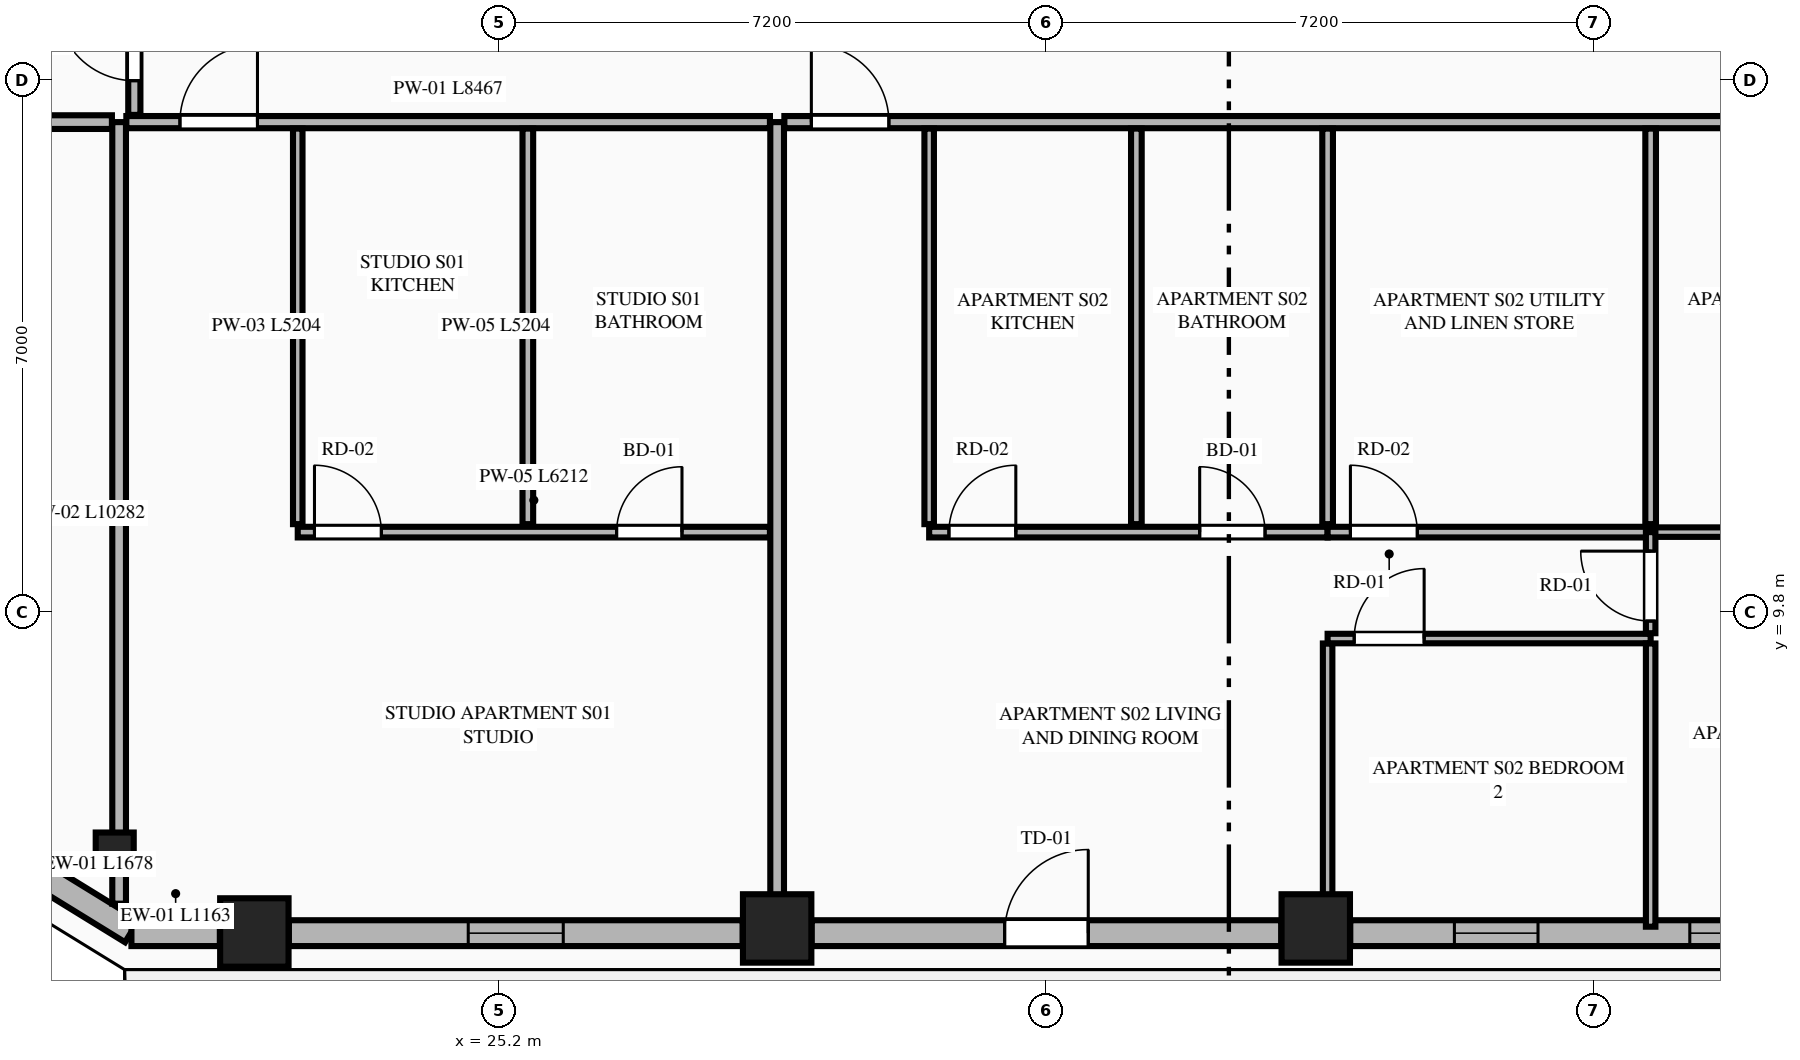
"""IFC4 building model, lengths in metres.
Left out: names, types, materials, properties, quantities, classifications, styles, units other than length and angle.
Written with IfcOpenShell. Run it as: python <this file> out.ifc"""

import sys

from ifc_helpers import new_model, si_unit, direction, frame, frame_2d, origin, origin_2d, place, context, subcontext, project, spatial, rectangle, extrude, element, fill, save


model = new_model("IFC4")
c1 = context("Model", 3, precision=1e-05, world=origin(), true_north=direction((0.0, 1.0)))
c2 = subcontext(c1, "Body", "Model", "MODEL_VIEW")
j1 = project(units=[si_unit("LENGTHUNIT", "METRE"), si_unit("PLANEANGLEUNIT", "RADIAN")], contexts=[c1])
p1 = place(None, origin())
s1 = spatial("IfcSite", under=j1, at=p1, CompositionType="ELEMENT")
p2 = place(p1, origin())
s2 = spatial("IfcBuilding", under=s1, at=p2, CompositionType="ELEMENT")
p3 = place(p2, frame((0.0, 0.0, 175.45)))
s3 = spatial("IfcBuildingStorey", under=s2, at=p3, CompositionType="ELEMENT", Elevation=175.45)
for number, where, z_axis, x_axis in (
    (1, (21.979, 5.589, 0.0), (0.0, 0.0, 1.0), (1.0, 0.0, 0.0)),
    (2, (28.857, 5.642, 0.0), (0.0, 0.0, 1.0), (1.0, 0.0, 0.0)),
    (3, (35.943, 5.642, 0.0), (0.0, 0.0, 1.0), (1.0, 0.0, 0.0)),
):
    element("IfcColumn", number, at=place(p3, frame(where, z_axis=z_axis, x_axis=x_axis)), inside=s3, PredefinedType="COLUMN", context=c2, shape_type="SweptSolid", body=[
        extrude(rectangle(XDim=0.9, YDim=0.9, at=origin_2d()), origin(), (0.0, 0.0, 1.0), 3.55),
    ])
p4 = place(p3, frame((20.142, 6.654, 0.0), z_axis=(0.0, 0.0, 1.0), x_axis=(0.865230187018, -0.501374833306, 0.0)))
e4 = element("IfcColumn", 4, at=p4, inside=s3, PredefinedType="PILASTER", context=c2, shape_type="SweptSolid", body=[
    extrude(rectangle(XDim=0.5, YDim=0.35, at=origin_2d()), origin(), (0.0, 0.0, 1.0), 3.55),
])
p5 = place(p3, frame((18.938, 6.484, 0.0), z_axis=(0.0, 0.0, 1.0), x_axis=(0.851778214877, -0.523902541185, 0.0)))
e5 = element("IfcWall", 5, at=p5, inside=s3, PredefinedType="STANDARD", context=c2, shape_type="SweptSolid", body=[
    extrude(rectangle(XDim=1.678, YDim=0.34, at=frame_2d((0.839, 0.0))), origin(), (0.0, 0.0, 1.0), 3.35),
])
p6 = place(p3, frame((20.362, 5.58, 0.0), z_axis=(0.0, 0.0, 1.0), x_axis=(1.0, 0.0, 0.0)))
e6 = element("IfcWall", 6, at=p6, inside=s3, PredefinedType="STANDARD", context=c2, shape_type="SweptSolid", body=[
    extrude(rectangle(XDim=1.163, YDim=0.34, at=frame_2d((0.582, 0.0))), origin(), (0.0, 0.0, 1.0), 3.35),
])
p7 = place(p3, frame((22.433, 5.58, 0.0), z_axis=(0.0, 0.0, 1.0), x_axis=(1.0, 0.0, 0.0)))
e7 = element("IfcWall", 7, at=p7, inside=s3, PredefinedType="STANDARD", context=c2, shape_type="SweptSolid", body=[
    extrude(rectangle(XDim=5.97, YDim=0.34, at=frame_2d((2.985, 0.0))), origin(), (0.0, 0.0, 1.0), 2.883),
])
p8 = place(p7, frame((2.36, 0.0, 0.75)))
e8 = element("IfcOpeningElement", 8, at=p8, cuts=e7, PredefinedType="OPENING", context=c2, shape_type="SweptSolid", body=[
    extrude(rectangle(XDim=1.25, YDim=1.95, at=frame_2d((0.625, 0.975))), frame((0.0, 0.18, 0.0), z_axis=(0.0, -1.0, 0.0), x_axis=(1.0, 0.0, 0.0)), (0.0, 0.0, 1.0), 0.36),
])
p9 = place(p3, frame((29.311, 5.58, 0.0), z_axis=(0.0, 0.0, 1.0), x_axis=(1.0, 0.0, 0.0)))
e9 = element("IfcWall", 9, at=p9, inside=s3, PredefinedType="STANDARD", context=c2, shape_type="SweptSolid", body=[
    extrude(rectangle(XDim=6.178, YDim=0.34, at=frame_2d((3.089, 0.0))), origin(), (0.0, 0.0, 1.0), 2.883),
])
p10 = place(p9, frame((2.539, 0.0, 0.0)))
e10 = element("IfcOpeningElement", 10, at=p10, cuts=e9, PredefinedType="OPENING", context=c2, shape_type="SweptSolid", body=[
    extrude(rectangle(XDim=1.1, YDim=2.25, at=frame_2d((0.55, 1.125))), frame((0.0, 0.18, 0.0), z_axis=(0.0, -1.0, 0.0), x_axis=(1.0, 0.0, 0.0)), (0.0, 0.0, 1.0), 0.36),
])
p11 = place(p3, frame((36.397, 5.58, 0.0), z_axis=(0.0, 0.0, 1.0), x_axis=(1.0, 0.0, 0.0)))
e11 = element("IfcWall", 11, at=p11, inside=s3, PredefinedType="STANDARD", context=c2, shape_type="SweptSolid", body=[
    extrude(rectangle(XDim=5.97, YDim=0.34, at=frame_2d((2.985, 0.0))), origin(), (0.0, 0.0, 1.0), 2.883),
])
p12 = place(p11, frame((1.37, 0.0, 0.75)))
e12 = element("IfcOpeningElement", 12, at=p12, cuts=e11, PredefinedType="OPENING", context=c2, shape_type="SweptSolid", body=[
    extrude(rectangle(XDim=1.1, YDim=1.983, at=frame_2d((0.55, 0.991))), frame((0.0, 0.18, 0.0), z_axis=(0.0, -1.0, 0.0), x_axis=(1.0, 0.0, 0.0)), (0.0, 0.0, 1.0), 0.36),
])
p13 = place(p11, frame((4.467, 0.0, 0.75)))
e13 = element("IfcOpeningElement", 13, at=p13, cuts=e11, PredefinedType="OPENING", context=c2, shape_type="SweptSolid", body=[
    extrude(rectangle(XDim=1.1, YDim=1.983, at=frame_2d((0.55, 0.991))), frame((0.0, 0.18, 0.0), z_axis=(0.0, -1.0, 0.0), x_axis=(1.0, 0.0, 0.0)), (0.0, 0.0, 1.0), 0.36),
])
p14 = place(p3, frame((20.2, 5.968, 0.0), z_axis=(0.0, 0.0, 1.0), x_axis=(0.0, 1.0, 0.0)))
e14 = element("IfcWall", 14, at=p14, inside=s3, PredefinedType="PARTITIONING", context=c2, shape_type="SweptSolid", body=[
    extrude(rectangle(XDim=10.282, YDim=0.18, at=frame_2d((5.141, 0.0))), origin(), (0.0, 0.0, 1.0), 3.35),
])
p15 = place(p3, frame((28.857, 5.755, 0.0), z_axis=(0.0, 0.0, 1.0), x_axis=(0.0, 1.0, 0.0)))
e15 = element("IfcWall", 15, at=p15, inside=s3, PredefinedType="PARTITIONING", context=c2, shape_type="SweptSolid", body=[
    extrude(rectangle(XDim=10.495, YDim=0.18, at=frame_2d((5.248, 0.0))), origin(), (0.0, 0.0, 1.0), 2.807),
])
p16 = place(p3, frame((20.295, 16.25, 0.0), z_axis=(0.0, 0.0, 1.0), x_axis=(1.0, 0.0, 0.0)))
e16 = element("IfcWall", 16, at=p16, inside=s3, PredefinedType="PARTITIONING", context=c2, shape_type="SweptSolid", body=[
    extrude(rectangle(XDim=8.467, YDim=0.16, at=frame_2d((4.233, 0.0))), origin(), (0.0, 0.0, 1.0), 3.35),
])
p17 = place(p16, frame((0.705, 0.0, 0.0)))
e17 = element("IfcOpeningElement", 17, at=p17, cuts=e16, PredefinedType="OPENING", context=c2, shape_type="SweptSolid", body=[
    extrude(rectangle(XDim=1.02, YDim=2.25, at=frame_2d((0.51, 1.125))), frame((0.0, 0.09, 0.0), z_axis=(0.0, -1.0, 0.0), x_axis=(1.0, 0.0, 0.0)), (0.0, 0.0, 1.0), 0.18),
])
p18 = place(p3, frame((22.55, 10.961, 0.0), z_axis=(0.0, 0.0, 1.0), x_axis=(0.0, 1.0, 0.0)))
e18 = element("IfcWall", 18, at=p18, inside=s3, PredefinedType="PARTITIONING", context=c2, shape_type="SweptSolid", body=[
    extrude(rectangle(XDim=5.204, YDim=0.125, at=frame_2d((2.602, 0.0))), origin(), (0.0, 0.0, 1.0), 2.807),
])
p19 = place(p3, frame((22.55, 10.856, 0.0), z_axis=(0.0, 0.0, 1.0), x_axis=(1.0, 0.0, 0.0)))
e19 = element("IfcWall", 19, at=p19, inside=s3, PredefinedType="PLUMBINGWALL", context=c2, shape_type="SweptSolid", body=[
    extrude(rectangle(XDim=6.212, YDim=0.14, at=frame_2d((3.106, 0.0))), origin(), (0.0, 0.0, 1.0), 3.35),
])
p20 = place(p19, frame((4.195, 0.0, 0.0)))
e20 = element("IfcOpeningElement", 20, at=p20, cuts=e19, PredefinedType="OPENING", context=c2, shape_type="SweptSolid", body=[
    extrude(rectangle(XDim=0.86, YDim=2.1, at=frame_2d((0.43, 1.05))), frame((0.0, 0.08, 0.0), z_axis=(0.0, -1.0, 0.0), x_axis=(1.0, 0.0, 0.0)), (0.0, 0.0, 1.0), 0.16),
])
p21 = place(p19, frame((0.22, 0.0, 0.0)))
e21 = element("IfcOpeningElement", 21, at=p21, cuts=e19, PredefinedType="OPENING", context=c2, shape_type="SweptSolid", body=[
    extrude(rectangle(XDim=0.88, YDim=2.15, at=frame_2d((0.44, 1.075))), frame((0.0, 0.08, 0.0), z_axis=(0.0, -1.0, 0.0), x_axis=(1.0, 0.0, 0.0)), (0.0, 0.0, 1.0), 0.16),
])
p22 = place(p3, frame((25.577, 10.961, 0.0), z_axis=(0.0, 0.0, 1.0), x_axis=(0.0, 1.0, 0.0)))
e22 = element("IfcWall", 22, at=p22, inside=s3, PredefinedType="PLUMBINGWALL", context=c2, shape_type="SweptSolid", body=[
    extrude(rectangle(XDim=5.204, YDim=0.14, at=frame_2d((2.602, 0.0))), origin(), (0.0, 0.0, 1.0), 3.35),
])
p23 = place(p3, frame((28.952, 16.25, 0.0), z_axis=(0.0, 0.0, 1.0), x_axis=(1.0, 0.0, 0.0)))
e23 = element("IfcWall", 23, at=p23, inside=s3, PredefinedType="PARTITIONING", context=c2, shape_type="SweptSolid", body=[
    extrude(rectangle(XDim=15.553, YDim=0.16, at=frame_2d((7.776, 0.0))), origin(), (0.0, 0.0, 1.0), 3.35),
])
p24 = place(p23, frame((0.355, 0.0, 0.0)))
e24 = element("IfcOpeningElement", 24, at=p24, cuts=e23, PredefinedType="OPENING", context=c2, shape_type="SweptSolid", body=[
    extrude(rectangle(XDim=1.02, YDim=2.25, at=frame_2d((0.51, 1.125))), frame((0.0, 0.09, 0.0), z_axis=(0.0, -1.0, 0.0), x_axis=(1.0, 0.0, 0.0)), (0.0, 0.0, 1.0), 0.18),
])
p25 = place(p3, frame((30.857, 10.961, 0.0), z_axis=(0.0, 0.0, 1.0), x_axis=(0.0, 1.0, 0.0)))
e25 = element("IfcWall", 25, at=p25, inside=s3, PredefinedType="PARTITIONING", context=c2, shape_type="SweptSolid", body=[
    extrude(rectangle(XDim=5.204, YDim=0.125, at=frame_2d((2.602, 0.0))), origin(), (0.0, 0.0, 1.0), 3.35),
])
p26 = place(p3, frame((30.857, 10.856, 0.0), z_axis=(0.0, 0.0, 1.0), x_axis=(1.0, 0.0, 0.0)))
e26 = element("IfcWall", 26, at=p26, inside=s3, PredefinedType="PLUMBINGWALL", context=c2, shape_type="SweptSolid", body=[
    extrude(rectangle(XDim=5.242, YDim=0.14, at=frame_2d((2.621, 0.0))), origin(), (0.0, 0.0, 1.0), 3.35),
])
p27 = place(p26, frame((3.559, 0.0, 0.0)))
e27 = element("IfcOpeningElement", 27, at=p27, cuts=e26, PredefinedType="OPENING", context=c2, shape_type="SweptSolid", body=[
    extrude(rectangle(XDim=0.86, YDim=2.1, at=frame_2d((0.43, 1.05))), frame((0.0, 0.08, 0.0), z_axis=(0.0, -1.0, 0.0), x_axis=(1.0, 0.0, 0.0)), (0.0, 0.0, 1.0), 0.16),
])
p28 = place(p26, frame((0.26, 0.0, 0.0)))
e28 = element("IfcOpeningElement", 28, at=p28, cuts=e26, PredefinedType="OPENING", context=c2, shape_type="SweptSolid", body=[
    extrude(rectangle(XDim=0.88, YDim=2.15, at=frame_2d((0.44, 1.075))), frame((0.0, 0.08, 0.0), z_axis=(0.0, -1.0, 0.0), x_axis=(1.0, 0.0, 0.0)), (0.0, 0.0, 1.0), 0.16),
])
p29 = place(p3, frame((36.099, 10.856, 0.0), z_axis=(0.0, 0.0, 1.0), x_axis=(1.0, 0.0, 0.0)))
e29 = element("IfcWall", 29, at=p29, inside=s3, PredefinedType="PLUMBINGWALL", context=c2, shape_type="SweptSolid", body=[
    extrude(rectangle(XDim=4.25, YDim=0.14, at=frame_2d((2.125, 0.0))), origin(), (0.0, 0.0, 1.0), 3.35),
])
p30 = place(p29, frame((0.3, 0.0, 0.0)))
e30 = element("IfcOpeningElement", 30, at=p30, cuts=e29, PredefinedType="OPENING", context=c2, shape_type="SweptSolid", body=[
    extrude(rectangle(XDim=0.88, YDim=2.15, at=frame_2d((0.44, 1.075))), frame((0.0, 0.08, 0.0), z_axis=(0.0, -1.0, 0.0), x_axis=(1.0, 0.0, 0.0)), (0.0, 0.0, 1.0), 0.16),
])
p31 = place(p3, frame((40.349, 10.856, 0.0), z_axis=(0.0, 0.0, 1.0), x_axis=(1.0, 0.0, 0.0)))
e31 = element("IfcWall", 31, at=p31, inside=s3, PredefinedType="PARTITIONING", context=c2, shape_type="SweptSolid", body=[
    extrude(rectangle(XDim=4.156, YDim=0.125, at=frame_2d((2.078, 0.0))), origin(), (0.0, 0.0, 1.0), 3.35),
])
p32 = place(p31, frame((1.653, 0.0, 0.0)))
e32 = element("IfcOpeningElement", 32, at=p32, cuts=e31, PredefinedType="OPENING", context=c2, shape_type="SweptSolid", body=[
    extrude(rectangle(XDim=0.86, YDim=2.1, at=frame_2d((0.43, 1.05))), frame((0.0, 0.073, 0.0), z_axis=(0.0, -1.0, 0.0), x_axis=(1.0, 0.0, 0.0)), (0.0, 0.0, 1.0), 0.145),
])
p33 = place(p3, frame((33.583, 10.961, 0.0), z_axis=(0.0, 0.0, 1.0), x_axis=(0.0, 1.0, 0.0)))
e33 = element("IfcWall", 33, at=p33, inside=s3, PredefinedType="PLUMBINGWALL", context=c2, shape_type="SweptSolid", body=[
    extrude(rectangle(XDim=5.204, YDim=0.14, at=frame_2d((2.602, 0.0))), origin(), (0.0, 0.0, 1.0), 3.35),
])
p34 = place(p3, frame((36.099, 5.665, 0.0), z_axis=(0.0, 0.0, 1.0), x_axis=(0.0, 1.0, 0.0)))
e34 = element("IfcWall", 34, at=p34, inside=s3, PredefinedType="PARTITIONING", context=c2, shape_type="SweptSolid", body=[
    extrude(rectangle(XDim=3.726, YDim=0.125, at=frame_2d((1.863, 0.0))), origin(), (0.0, 0.0, 1.0), 3.35),
])
p35 = place(p3, frame((36.099, 9.456, 0.0), z_axis=(0.0, 0.0, 1.0), x_axis=(1.0, 0.0, 0.0)))
e35 = element("IfcWall", 35, at=p35, inside=s3, PredefinedType="PARTITIONING", context=c2, shape_type="SweptSolid", body=[
    extrude(rectangle(XDim=4.25, YDim=0.125, at=frame_2d((2.125, 0.0))), origin(), (0.0, 0.0, 1.0), 3.35),
])
p36 = place(p35, frame((0.35, 0.0, 0.0)))
e36 = element("IfcOpeningElement", 36, at=p36, cuts=e35, PredefinedType="OPENING", context=c2, shape_type="SweptSolid", body=[
    extrude(rectangle(XDim=0.92, YDim=2.15, at=frame_2d((0.46, 1.075))), frame((0.0, 0.073, 0.0), z_axis=(0.0, -1.0, 0.0), x_axis=(1.0, 0.0, 0.0)), (0.0, 0.0, 1.0), 0.145),
])
p37 = place(p3, frame((40.349, 9.526, 0.0), z_axis=(0.0, 0.0, 1.0), x_axis=(0.0, 1.0, 0.0)))
e37 = element("IfcWall", 37, at=p37, inside=s3, PredefinedType="PARTITIONING", context=c2, shape_type="SweptSolid", body=[
    extrude(rectangle(XDim=1.33, YDim=0.125, at=frame_2d((0.665, 0.0))), origin(), (0.0, 0.0, 1.0), 3.35),
])
p38 = place(p37, frame((0.16, 0.0, 0.0)))
e38 = element("IfcOpeningElement", 38, at=p38, cuts=e37, PredefinedType="OPENING", context=c2, shape_type="SweptSolid", body=[
    extrude(rectangle(XDim=0.92, YDim=2.15, at=frame_2d((0.46, 1.075))), frame((0.0, 0.073, 0.0), z_axis=(0.0, -1.0, 0.0), x_axis=(1.0, 0.0, 0.0)), (0.0, 0.0, 1.0), 0.145),
])
for number, where, z_axis, x_axis in (
    (39, (36.099, 10.961, 0.0), (0.0, 0.0, 1.0), (0.0, 1.0, 0.0)),
    (40, (40.349, 10.961, 0.0), (0.0, 0.0, 1.0), (0.0, 1.0, 0.0)),
):
    element("IfcWall", number, at=place(p3, frame(where, z_axis=z_axis, x_axis=x_axis)), inside=s3, PredefinedType="PLUMBINGWALL", context=c2, shape_type="SweptSolid", body=[
        extrude(rectangle(XDim=5.204, YDim=0.14, at=frame_2d((2.602, 0.0))), origin(), (0.0, 0.0, 1.0), 3.35),
    ])
p39 = place(p3, frame((40.349, 5.665, 0.0), z_axis=(0.0, 0.0, 1.0), x_axis=(0.0, 1.0, 0.0)))
e41 = element("IfcWall", 41, at=p39, inside=s3, PredefinedType="PARTITIONING", context=c2, shape_type="SweptSolid", body=[
    extrude(rectangle(XDim=3.726, YDim=0.125, at=frame_2d((1.863, 0.0))), origin(), (0.0, 0.0, 1.0), 3.35),
])
p40 = place(p3, frame((14.211, 16.25, 0.0), z_axis=(0.0, 0.0, 1.0), x_axis=(1.0, 0.0, 0.0)))
e42 = element("IfcWall", 42, at=p40, inside=s3, PredefinedType="PARTITIONING", context=c2, shape_type="SweptSolid", body=[
    extrude(rectangle(XDim=5.894, YDim=0.18, at=frame_2d((2.947, 0.0))), origin(), (0.0, 0.0, 1.0), 3.35),
])
p41 = place(p3, frame((20.4, 16.345, 0.0), z_axis=(0.0, 0.0, 1.0), x_axis=(0.0, 1.0, 0.0)))
e43 = element("IfcWall", 43, at=p41, inside=s3, PredefinedType="PARTITIONING", context=c2, shape_type="SweptSolid", body=[
    extrude(rectangle(XDim=18.71, YDim=0.16, at=frame_2d((9.355, 0.0))), origin(), (0.0, 0.0, 1.0), 3.35),
])
p42 = place(p41, frame((0.45, 0.0, 0.0)))
e44 = element("IfcOpeningElement", 44, at=p42, cuts=e43, PredefinedType="OPENING", context=c2, shape_type="SweptSolid", body=[
    extrude(rectangle(XDim=1.02, YDim=2.25, at=frame_2d((0.51, 1.125))), frame((0.0, 0.09, 0.0), z_axis=(0.0, -1.0, 0.0), x_axis=(1.0, 0.0, 0.0)), (0.0, 0.0, 1.0), 0.18),
])
p43 = place(p8, origin())
e45 = element("IfcWindow", 45, at=p43, inside=s3, PartitioningType="SINGLE_PANEL", PredefinedType="WINDOW", context=c2, shape_type="SweptSolid", body=[
    extrude(rectangle(XDim=1.25, YDim=1.95, at=frame_2d((0.625, 0.975))), frame((0.0, 0.03, 0.0), z_axis=(0.0, -1.0, 0.0), x_axis=(1.0, 0.0, 0.0)), (0.0, 0.0, 1.0), 0.06),
])
fill(e8, e45)
p44 = place(p10, origin())
e46 = element("IfcDoor", 46, at=p44, inside=s3, OperationType="SINGLE_SWING_RIGHT", PredefinedType="DOOR", context=c2, shape_type="SweptSolid", body=[
    extrude(rectangle(XDim=1.1, YDim=2.25, at=frame_2d((0.55, 1.125))), frame((0.0, 0.025, 0.0), z_axis=(0.0, -1.0, 0.0), x_axis=(1.0, 0.0, 0.0)), (0.0, 0.0, 1.0), 0.05),
])
fill(e10, e46)
p45 = place(p12, origin())
e47 = element("IfcWindow", 47, at=p45, inside=s3, PartitioningType="SINGLE_PANEL", PredefinedType="WINDOW", context=c2, shape_type="SweptSolid", body=[
    extrude(rectangle(XDim=1.1, YDim=1.983, at=frame_2d((0.55, 0.991))), frame((0.0, 0.03, 0.0), z_axis=(0.0, -1.0, 0.0), x_axis=(1.0, 0.0, 0.0)), (0.0, 0.0, 1.0), 0.06),
])
fill(e12, e47)
p46 = place(p20, origin())
e48 = element("IfcDoor", 48, at=p46, inside=s3, OperationType="SINGLE_SWING_RIGHT", PredefinedType="DOOR", context=c2, shape_type="SweptSolid", body=[
    extrude(rectangle(XDim=0.86, YDim=2.1, at=frame_2d((0.43, 1.05))), frame((0.0, 0.025, 0.0), z_axis=(0.0, -1.0, 0.0), x_axis=(1.0, 0.0, 0.0)), (0.0, 0.0, 1.0), 0.05),
])
fill(e20, e48)
p47 = place(p17, origin())
e49 = element("IfcDoor", 49, at=p47, inside=s3, OperationType="SINGLE_SWING_RIGHT", PredefinedType="DOOR", context=c2, shape_type="SweptSolid", body=[
    extrude(rectangle(XDim=1.02, YDim=2.25, at=frame_2d((0.51, 1.125))), frame((0.0, 0.025, 0.0), z_axis=(0.0, -1.0, 0.0), x_axis=(1.0, 0.0, 0.0)), (0.0, 0.0, 1.0), 0.05),
])
fill(e17, e49)
p48 = place(p21, origin())
e50 = element("IfcDoor", 50, at=p48, inside=s3, OperationType="SINGLE_SWING_LEFT", PredefinedType="DOOR", context=c2, shape_type="SweptSolid", body=[
    extrude(rectangle(XDim=0.88, YDim=2.15, at=frame_2d((0.44, 1.075))), frame((0.0, 0.025, 0.0), z_axis=(0.0, -1.0, 0.0), x_axis=(1.0, 0.0, 0.0)), (0.0, 0.0, 1.0), 0.05),
])
fill(e21, e50)
p49 = place(p27, origin())
e51 = element("IfcDoor", 51, at=p49, inside=s3, OperationType="SINGLE_SWING_LEFT", PredefinedType="DOOR", context=c2, shape_type="SweptSolid", body=[
    extrude(rectangle(XDim=0.86, YDim=2.1, at=frame_2d((0.43, 1.05))), frame((0.0, 0.025, 0.0), z_axis=(0.0, -1.0, 0.0), x_axis=(1.0, 0.0, 0.0)), (0.0, 0.0, 1.0), 0.05),
])
fill(e27, e51)
p50 = place(p24, origin())
e52 = element("IfcDoor", 52, at=p50, inside=s3, OperationType="SINGLE_SWING_LEFT", PredefinedType="DOOR", context=c2, shape_type="SweptSolid", body=[
    extrude(rectangle(XDim=1.02, YDim=2.25, at=frame_2d((0.51, 1.125))), frame((0.0, 0.025, 0.0), z_axis=(0.0, -1.0, 0.0), x_axis=(1.0, 0.0, 0.0)), (0.0, 0.0, 1.0), 0.05),
])
fill(e24, e52)
p51 = place(p28, origin())
e53 = element("IfcDoor", 53, at=p51, inside=s3, OperationType="SINGLE_SWING_RIGHT", PredefinedType="DOOR", context=c2, shape_type="SweptSolid", body=[
    extrude(rectangle(XDim=0.88, YDim=2.15, at=frame_2d((0.44, 1.075))), frame((0.0, 0.025, 0.0), z_axis=(0.0, -1.0, 0.0), x_axis=(1.0, 0.0, 0.0)), (0.0, 0.0, 1.0), 0.05),
])
fill(e28, e53)
p52 = place(p30, origin())
e54 = element("IfcDoor", 54, at=p52, inside=s3, OperationType="SINGLE_SWING_LEFT", PredefinedType="DOOR", context=c2, shape_type="SweptSolid", body=[
    extrude(rectangle(XDim=0.88, YDim=2.15, at=frame_2d((0.44, 1.075))), frame((0.0, 0.025, 0.0), z_axis=(0.0, -1.0, 0.0), x_axis=(1.0, 0.0, 0.0)), (0.0, 0.0, 1.0), 0.05),
])
fill(e30, e54)
p53 = place(p36, origin())
e55 = element("IfcDoor", 55, at=p53, inside=s3, OperationType="SINGLE_SWING_RIGHT", PredefinedType="DOOR", context=c2, shape_type="SweptSolid", body=[
    extrude(rectangle(XDim=0.92, YDim=2.15, at=frame_2d((0.46, 1.075))), frame((0.0, 0.025, 0.0), z_axis=(0.0, -1.0, 0.0), x_axis=(1.0, 0.0, 0.0)), (0.0, 0.0, 1.0), 0.05),
])
fill(e36, e55)
p54 = place(p38, origin())
e56 = element("IfcDoor", 56, at=p54, inside=s3, OperationType="SINGLE_SWING_RIGHT", PredefinedType="DOOR", context=c2, shape_type="SweptSolid", body=[
    extrude(rectangle(XDim=0.92, YDim=2.15, at=frame_2d((0.46, 1.075))), frame((0.0, 0.025, 0.0), z_axis=(0.0, -1.0, 0.0), x_axis=(1.0, 0.0, 0.0)), (0.0, 0.0, 1.0), 0.05),
])
fill(e38, e56)
p55 = place(p42, origin())
e57 = element("IfcDoor", 57, at=p55, inside=s3, OperationType="SINGLE_SWING_RIGHT", PredefinedType="DOOR", context=c2, shape_type="SweptSolid", body=[
    extrude(rectangle(XDim=1.02, YDim=2.25, at=frame_2d((0.51, 1.125))), frame((0.0, 0.025, 0.0), z_axis=(0.0, -1.0, 0.0), x_axis=(1.0, 0.0, 0.0)), (0.0, 0.0, 1.0), 0.05),
])
fill(e44, e57)
p56 = place(p13, origin())
e58 = element("IfcWindow", 58, at=p56, inside=s3, PartitioningType="SINGLE_PANEL", PredefinedType="WINDOW", context=c2, shape_type="SweptSolid", body=[
    extrude(rectangle(XDim=1.1, YDim=1.983, at=frame_2d((0.55, 0.991))), frame((0.0, 0.03, 0.0), z_axis=(0.0, -1.0, 0.0), x_axis=(1.0, 0.0, 0.0)), (0.0, 0.0, 1.0), 0.06),
])
fill(e13, e58)
save(model, sys.argv[1])
